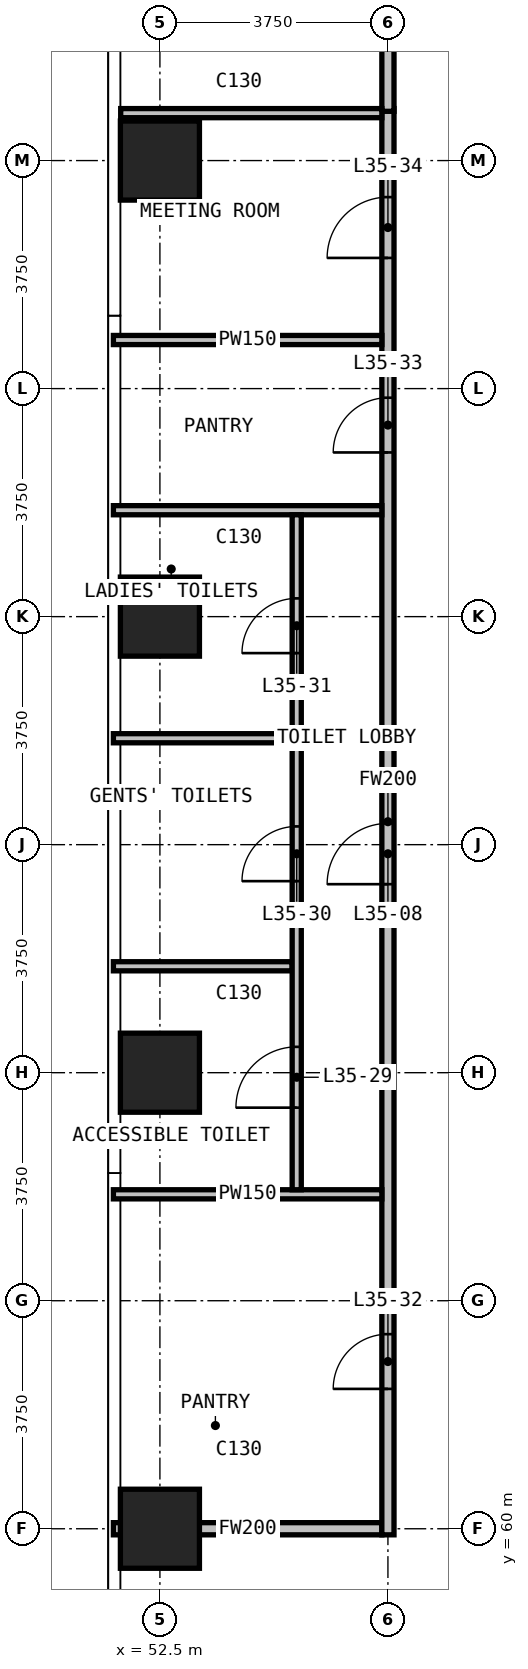
"""IFC4 building model, lengths in metres.
Left out: names, types, materials, properties, quantities, classifications, styles, units other than length and angle.
Written with IfcOpenShell. Run it as: python <this file> out.ifc"""

import sys

from ifc_helpers import new_model, si_unit, direction, frame, frame_2d, origin, origin_2d, place, context, subcontext, project, spatial, rectangle, extrude, element, fill, save


model = new_model("IFC4")
c1 = context("Model", 3, precision=1e-05, world=origin(), true_north=direction((0.0, 1.0)))
c2 = subcontext(c1, "Body", "Model", "MODEL_VIEW")
j1 = project(units=[si_unit("LENGTHUNIT", "METRE"), si_unit("PLANEANGLEUNIT", "RADIAN")], contexts=[c1])
p1 = place(None, origin())
s1 = spatial("IfcSite", under=j1, at=p1, CompositionType="ELEMENT")
p2 = place(p1, origin())
s2 = spatial("IfcBuilding", under=s1, at=p2, CompositionType="ELEMENT")
p3 = place(p2, frame((0.0, 0.0, 139.6)))
s3 = spatial("IfcBuildingStorey", under=s2, at=p3, CompositionType="ELEMENT", Elevation=139.6)
for number, where, z_axis, x_axis in (
    (1, (52.5, 60.0, 0.0), (0.0, 0.0, 1.0), (1.0, 0.0, 0.0)),
    (2, (52.5, 67.5, 0.0), (0.0, 0.0, 1.0), (1.0, 0.0, 0.0)),
    (3, (52.5, 75.0, 0.0), (0.0, 0.0, 1.0), (1.0, 0.0, 0.0)),
    (4, (52.5, 82.5, 0.0), (0.0, 0.0, 1.0), (1.0, 0.0, 0.0)),
):
    element("IfcColumn", number, at=place(p3, frame(where, z_axis=z_axis, x_axis=x_axis)), inside=s3, PredefinedType="COLUMN", context=c2, shape_type="SweptSolid", body=[
        extrude(rectangle(XDim=1.3, YDim=1.3, at=origin_2d()), origin(), (0.0, 0.0, 1.0), 3.6),
    ])
p4 = place(p3, frame((51.735, 60.0, 0.0), z_axis=(0.0, 0.0, 1.0), x_axis=(1.0, 0.0, 0.0)))
e5 = element("IfcWall", 5, at=p4, inside=s3, PredefinedType="PARTITIONING", context=c2, shape_type="SweptSolid", body=[
    extrude(rectangle(XDim=4.415, YDim=0.2, at=frame_2d((2.208, 0.0))), origin(), (0.0, 0.0, 1.0), 3.3),
])
p5 = place(p3, frame((56.25, 59.9, 0.0), z_axis=(0.0, 0.0, 1.0), x_axis=(0.0, 1.0, 0.0)))
e6 = element("IfcWall", 6, at=p5, inside=s3, PredefinedType="PARTITIONING", context=c2, shape_type="SweptSolid", body=[
    extrude(rectangle(XDim=23.455, YDim=0.2, at=frame_2d((11.728, 0.0))), origin(), (0.0, 0.0, 1.0), 3.3),
])
p6 = place(p5, frame((10.7, 0.0, 0.0)))
e7 = element("IfcOpeningElement", 7, at=p6, cuts=e6, PredefinedType="OPENING", context=c2, shape_type="SweptSolid", body=[
    extrude(rectangle(XDim=1.0, YDim=2.2, at=frame_2d((0.5, 1.1))), frame((0.0, 0.11, 0.0), z_axis=(0.0, -1.0, 0.0), x_axis=(1.0, 0.0, 0.0)), (0.0, 0.0, 1.0), 0.22),
])
p7 = place(p5, frame((2.4, 0.0, 0.0)))
e8 = element("IfcOpeningElement", 8, at=p7, cuts=e6, PredefinedType="OPENING", context=c2, shape_type="SweptSolid", body=[
    extrude(rectangle(XDim=0.9, YDim=2.2, at=frame_2d((0.45, 1.1))), frame((0.0, 0.11, 0.0), z_axis=(0.0, -1.0, 0.0), x_axis=(1.0, 0.0, 0.0)), (0.0, 0.0, 1.0), 0.22),
])
p8 = place(p5, frame((17.8, 0.0, 0.0)))
e9 = element("IfcOpeningElement", 9, at=p8, cuts=e6, PredefinedType="OPENING", context=c2, shape_type="SweptSolid", body=[
    extrude(rectangle(XDim=0.9, YDim=2.2, at=frame_2d((0.45, 1.1))), frame((0.0, 0.11, 0.0), z_axis=(0.0, -1.0, 0.0), x_axis=(1.0, 0.0, 0.0)), (0.0, 0.0, 1.0), 0.22),
])
p9 = place(p5, frame((20.999, 0.0, 0.0)))
e10 = element("IfcOpeningElement", 10, at=p9, cuts=e6, PredefinedType="OPENING", context=c2, shape_type="SweptSolid", body=[
    extrude(rectangle(XDim=1.0, YDim=2.2, at=frame_2d((0.5, 1.1))), frame((0.0, 0.11, 0.0), z_axis=(0.0, -1.0, 0.0), x_axis=(1.0, 0.0, 0.0)), (0.0, 0.0, 1.0), 0.22),
])
p10 = place(p3, frame((56.25, 83.31, 0.0), z_axis=(0.0, 0.0, 1.0), x_axis=(0.0, 1.0, 0.0)))
e11 = element("IfcWall", 11, at=p10, inside=s3, PredefinedType="PARTITIONING", context=c2, shape_type="SweptSolid", body=[
    extrude(rectangle(XDim=7.335, YDim=0.2, at=frame_2d((3.667, 0.0))), origin(), (0.0, 0.0, 1.0), 3.3),
])
p11 = place(p3, frame((51.735, 65.5, 0.0), z_axis=(0.0, 0.0, 1.0), x_axis=(1.0, 0.0, 0.0)))
e12 = element("IfcWall", 12, at=p11, inside=s3, PredefinedType="PARTITIONING", context=c2, shape_type="SweptSolid", body=[
    extrude(rectangle(XDim=4.415, YDim=0.15, at=frame_2d((2.208, 0.0))), origin(), (0.0, 0.0, 1.0), 3.3),
])
for number, where, z_axis, x_axis in (
    (13, (51.735, 69.25, 0.0), (0.0, 0.0, 1.0), (1.0, 0.0, 0.0)),
    (14, (51.735, 73.0, 0.0), (0.0, 0.0, 1.0), (1.0, 0.0, 0.0)),
):
    element("IfcWall", number, at=place(p3, frame(where, z_axis=z_axis, x_axis=x_axis)), inside=s3, PredefinedType="PARTITIONING", context=c2, shape_type="SweptSolid", body=[
        extrude(rectangle(XDim=2.94, YDim=0.15, at=frame_2d((1.47, 0.0))), origin(), (0.0, 0.0, 1.0), 3.3),
    ])
for number, where, z_axis, x_axis in (
    (15, (51.735, 76.75, 0.0), (0.0, 0.0, 1.0), (1.0, 0.0, 0.0)),
    (16, (51.735, 79.549, 0.0), (0.0, 0.0, 1.0), (1.0, 0.0, 0.0)),
):
    element("IfcWall", number, at=place(p3, frame(where, z_axis=z_axis, x_axis=x_axis)), inside=s3, PredefinedType="PARTITIONING", context=c2, shape_type="SweptSolid", body=[
        extrude(rectangle(XDim=4.415, YDim=0.15, at=frame_2d((2.208, 0.0))), origin(), (0.0, 0.0, 1.0), 3.3),
    ])
p12 = place(p3, frame((51.855, 83.28, 0.0), z_axis=(0.0, 0.0, 1.0), x_axis=(1.0, 0.0, 0.0)))
e17 = element("IfcWall", 17, at=p12, inside=s3, PredefinedType="PARTITIONING", context=c2, shape_type="SweptSolid", body=[
    extrude(rectangle(XDim=4.295, YDim=0.15, at=frame_2d((2.147, 0.0))), origin(), (0.0, 0.0, 1.0), 3.3),
])
p13 = place(p3, frame((54.75, 65.575, 0.0), z_axis=(0.0, 0.0, 1.0), x_axis=(0.0, 1.0, 0.0)))
e18 = element("IfcWall", 18, at=p13, inside=s3, PredefinedType="PARTITIONING", context=c2, shape_type="SweptSolid", body=[
    extrude(rectangle(XDim=11.1, YDim=0.15, at=frame_2d((5.55, 0.0))), origin(), (0.0, 0.0, 1.0), 3.3),
])
p14 = place(p13, frame((1.35, 0.0, 0.0)))
e19 = element("IfcOpeningElement", 19, at=p14, cuts=e18, PredefinedType="OPENING", context=c2, shape_type="SweptSolid", body=[
    extrude(rectangle(XDim=1.0, YDim=2.2, at=frame_2d((0.5, 1.1))), frame((0.0, 0.085, 0.0), z_axis=(0.0, -1.0, 0.0), x_axis=(1.0, 0.0, 0.0)), (0.0, 0.0, 1.0), 0.17),
])
p15 = place(p13, frame((5.075, 0.0, 0.0)))
e20 = element("IfcOpeningElement", 20, at=p15, cuts=e18, PredefinedType="OPENING", context=c2, shape_type="SweptSolid", body=[
    extrude(rectangle(XDim=0.9, YDim=2.2, at=frame_2d((0.45, 1.1))), frame((0.0, 0.085, 0.0), z_axis=(0.0, -1.0, 0.0), x_axis=(1.0, 0.0, 0.0)), (0.0, 0.0, 1.0), 0.17),
])
p16 = place(p13, frame((8.825, 0.0, 0.0)))
e21 = element("IfcOpeningElement", 21, at=p16, cuts=e18, PredefinedType="OPENING", context=c2, shape_type="SweptSolid", body=[
    extrude(rectangle(XDim=0.9, YDim=2.2, at=frame_2d((0.45, 1.1))), frame((0.0, 0.085, 0.0), z_axis=(0.0, -1.0, 0.0), x_axis=(1.0, 0.0, 0.0)), (0.0, 0.0, 1.0), 0.17),
])
p17 = place(p6, origin())
e22 = element("IfcDoor", 22, at=p17, inside=s3, OperationType="SINGLE_SWING_RIGHT", PredefinedType="DOOR", context=c2, shape_type="SweptSolid", body=[
    extrude(rectangle(XDim=1.0, YDim=2.2, at=frame_2d((0.5, 1.1))), frame((0.0, 0.025, 0.0), z_axis=(0.0, -1.0, 0.0), x_axis=(1.0, 0.0, 0.0)), (0.0, 0.0, 1.0), 0.05),
])
fill(e7, e22)
p18 = place(p14, origin())
e23 = element("IfcDoor", 23, at=p18, inside=s3, OperationType="SINGLE_SWING_LEFT", PredefinedType="DOOR", context=c2, shape_type="SweptSolid", body=[
    extrude(rectangle(XDim=1.0, YDim=2.2, at=frame_2d((0.5, 1.1))), frame((0.0, 0.025, 0.0), z_axis=(0.0, -1.0, 0.0), x_axis=(1.0, 0.0, 0.0)), (0.0, 0.0, 1.0), 0.05),
])
fill(e19, e23)
p19 = place(p15, origin())
e24 = element("IfcDoor", 24, at=p19, inside=s3, OperationType="SINGLE_SWING_RIGHT", PredefinedType="DOOR", context=c2, shape_type="SweptSolid", body=[
    extrude(rectangle(XDim=0.9, YDim=2.2, at=frame_2d((0.45, 1.1))), frame((0.0, 0.025, 0.0), z_axis=(0.0, -1.0, 0.0), x_axis=(1.0, 0.0, 0.0)), (0.0, 0.0, 1.0), 0.05),
])
fill(e20, e24)
p20 = place(p16, origin())
e25 = element("IfcDoor", 25, at=p20, inside=s3, OperationType="SINGLE_SWING_LEFT", PredefinedType="DOOR", context=c2, shape_type="SweptSolid", body=[
    extrude(rectangle(XDim=0.9, YDim=2.2, at=frame_2d((0.45, 1.1))), frame((0.0, 0.025, 0.0), z_axis=(0.0, -1.0, 0.0), x_axis=(1.0, 0.0, 0.0)), (0.0, 0.0, 1.0), 0.05),
])
fill(e21, e25)
p21 = place(p7, origin())
e26 = element("IfcDoor", 26, at=p21, inside=s3, OperationType="SINGLE_SWING_LEFT", PredefinedType="DOOR", context=c2, shape_type="SweptSolid", body=[
    extrude(rectangle(XDim=0.9, YDim=2.2, at=frame_2d((0.45, 1.1))), frame((0.0, 0.025, 0.0), z_axis=(0.0, -1.0, 0.0), x_axis=(1.0, 0.0, 0.0)), (0.0, 0.0, 1.0), 0.05),
])
fill(e8, e26)
p22 = place(p8, origin())
e27 = element("IfcDoor", 27, at=p22, inside=s3, OperationType="SINGLE_SWING_LEFT", PredefinedType="DOOR", context=c2, shape_type="SweptSolid", body=[
    extrude(rectangle(XDim=0.9, YDim=2.2, at=frame_2d((0.45, 1.1))), frame((0.0, 0.025, 0.0), z_axis=(0.0, -1.0, 0.0), x_axis=(1.0, 0.0, 0.0)), (0.0, 0.0, 1.0), 0.05),
])
fill(e9, e27)
p23 = place(p9, origin())
e28 = element("IfcDoor", 28, at=p23, inside=s3, OperationType="SINGLE_SWING_LEFT", PredefinedType="DOOR", context=c2, shape_type="SweptSolid", body=[
    extrude(rectangle(XDim=1.0, YDim=2.2, at=frame_2d((0.5, 1.1))), frame((0.0, 0.025, 0.0), z_axis=(0.0, -1.0, 0.0), x_axis=(1.0, 0.0, 0.0)), (0.0, 0.0, 1.0), 0.05),
])
fill(e10, e28)
save(model, sys.argv[1])
